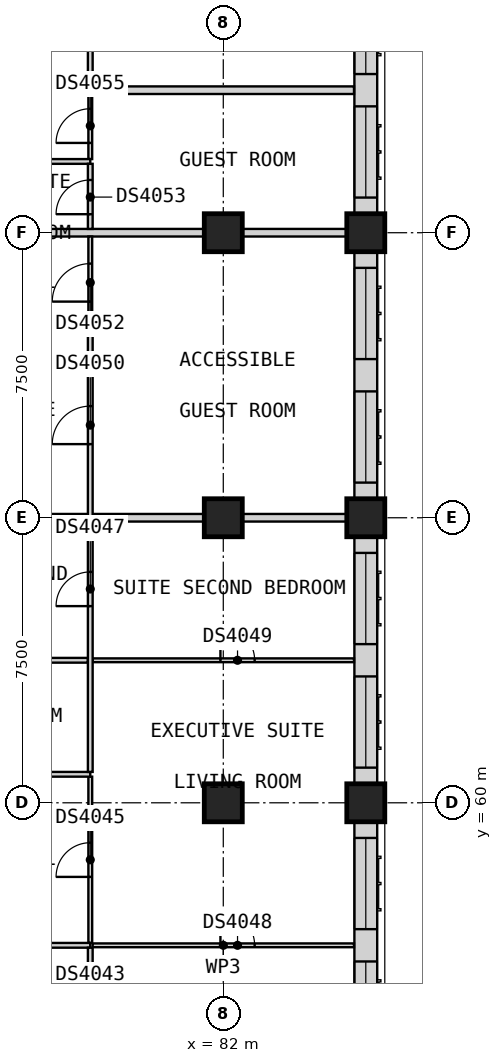
"""IFC4 building model, lengths in metres.
Left out: names, types, materials, properties, quantities, classifications, styles, units other than length and angle.
Written with IfcOpenShell. Run it as: python <this file> out.ifc"""

import sys

from ifc_helpers import new_model, si_unit, direction, frame, frame_2d, origin, origin_2d, place, context, subcontext, project, spatial, rectangle, extrude, element, fill, save


model = new_model("IFC4")
c1 = context("Model", 3, precision=1e-05, world=origin(), true_north=direction((0.0, 1.0)))
c2 = subcontext(c1, "Body", "Model", "MODEL_VIEW")
j1 = project(units=[si_unit("LENGTHUNIT", "METRE"), si_unit("PLANEANGLEUNIT", "RADIAN")], contexts=[c1])
p1 = place(None, origin())
s1 = spatial("IfcSite", under=j1, at=p1, CompositionType="ELEMENT")
p2 = place(p1, origin())
s2 = spatial("IfcBuilding", under=s1, at=p2, CompositionType="ELEMENT")
p3 = place(p2, frame((0.0, 0.0, 141.0)))
s3 = spatial("IfcBuildingStorey", under=s2, at=p3, CompositionType="ELEMENT", Elevation=141.0)
for number, where, z_axis, x_axis in (
    (1, (85.75, 60.0, 0.0), (0.0, 0.0, 1.0), (1.0, 0.0, 0.0)),
    (2, (85.75, 67.5, 0.0), (0.0, 0.0, 1.0), (1.0, 0.0, 0.0)),
    (3, (85.75, 75.0, 0.0), (0.0, 0.0, 1.0), (1.0, 0.0, 0.0)),
    (4, (82.0, 60.0, 0.0), (0.0, 0.0, 1.0), (1.0, 0.0, 0.0)),
    (5, (82.0, 67.5, 0.0), (0.0, 0.0, 1.0), (1.0, 0.0, 0.0)),
    (6, (82.0, 75.0, 0.0), (0.0, 0.0, 1.0), (1.0, 0.0, 0.0)),
):
    element("IfcColumn", number, at=place(p3, frame(where, z_axis=z_axis, x_axis=x_axis)), inside=s3, PredefinedType="COLUMN", context=c2, shape_type="SweptSolid", body=[
        extrude(rectangle(XDim=1.0, YDim=1.0, at=origin_2d()), origin(), (0.0, 0.0, 1.0), 3.6),
    ])
p4 = place(p3, frame((85.75, 53.0, 0.0), z_axis=(0.0, 0.0, 1.0), x_axis=(0.0, 1.0, 0.0)))
e7 = element("IfcWall", 7, at=p4, inside=s3, PredefinedType="SOLIDWALL", context=c2, shape_type="SweptSolid", body=[
    extrude(rectangle(XDim=6.5, YDim=0.6, at=frame_2d((3.25, 0.0))), origin(), (0.0, 0.0, 1.0), 2.85),
])
p5 = place(p4, frame((0.425, 0.0, 0.8)))
e8 = element("IfcOpeningElement", 8, at=p5, cuts=e7, PredefinedType="OPENING", context=c2, shape_type="SweptSolid", body=[
    extrude(rectangle(XDim=2.4, YDim=1.8, at=frame_2d((1.2, 0.9))), frame((0.0, 0.31, 0.0), z_axis=(0.0, -1.0, 0.0), x_axis=(1.0, 0.0, 0.0)), (0.0, 0.0, 1.0), 0.62),
])
p6 = place(p4, frame((3.675, 0.0, 0.8)))
e9 = element("IfcOpeningElement", 9, at=p6, cuts=e7, PredefinedType="OPENING", context=c2, shape_type="SweptSolid", body=[
    extrude(rectangle(XDim=2.4, YDim=1.8, at=frame_2d((1.2, 0.9))), frame((0.0, 0.31, 0.0), z_axis=(0.0, -1.0, 0.0), x_axis=(1.0, 0.0, 0.0)), (0.0, 0.0, 1.0), 0.62),
])
p7 = place(p3, frame((85.75, 60.5, 0.0), z_axis=(0.0, 0.0, 1.0), x_axis=(0.0, 1.0, 0.0)))
e10 = element("IfcWall", 10, at=p7, inside=s3, PredefinedType="SOLIDWALL", context=c2, shape_type="SweptSolid", body=[
    extrude(rectangle(XDim=6.5, YDim=0.6, at=frame_2d((3.25, 0.0))), origin(), (0.0, 0.0, 1.0), 2.85),
])
p8 = place(p7, frame((0.425, 0.0, 0.8)))
e11 = element("IfcOpeningElement", 11, at=p8, cuts=e10, PredefinedType="OPENING", context=c2, shape_type="SweptSolid", body=[
    extrude(rectangle(XDim=2.4, YDim=1.8, at=frame_2d((1.2, 0.9))), frame((0.0, 0.31, 0.0), z_axis=(0.0, -1.0, 0.0), x_axis=(1.0, 0.0, 0.0)), (0.0, 0.0, 1.0), 0.62),
])
p9 = place(p7, frame((3.675, 0.0, 0.8)))
e12 = element("IfcOpeningElement", 12, at=p9, cuts=e10, PredefinedType="OPENING", context=c2, shape_type="SweptSolid", body=[
    extrude(rectangle(XDim=2.4, YDim=1.8, at=frame_2d((1.2, 0.9))), frame((0.0, 0.31, 0.0), z_axis=(0.0, -1.0, 0.0), x_axis=(1.0, 0.0, 0.0)), (0.0, 0.0, 1.0), 0.62),
])
p10 = place(p3, frame((85.75, 68.0, 0.0), z_axis=(0.0, 0.0, 1.0), x_axis=(0.0, 1.0, 0.0)))
e13 = element("IfcWall", 13, at=p10, inside=s3, PredefinedType="SOLIDWALL", context=c2, shape_type="SweptSolid", body=[
    extrude(rectangle(XDim=6.5, YDim=0.6, at=frame_2d((3.25, 0.0))), origin(), (0.0, 0.0, 1.0), 2.85),
])
p11 = place(p10, frame((0.425, 0.0, 0.8)))
e14 = element("IfcOpeningElement", 14, at=p11, cuts=e13, PredefinedType="OPENING", context=c2, shape_type="SweptSolid", body=[
    extrude(rectangle(XDim=2.4, YDim=1.8, at=frame_2d((1.2, 0.9))), frame((0.0, 0.31, 0.0), z_axis=(0.0, -1.0, 0.0), x_axis=(1.0, 0.0, 0.0)), (0.0, 0.0, 1.0), 0.62),
])
p12 = place(p10, frame((3.675, 0.0, 0.8)))
e15 = element("IfcOpeningElement", 15, at=p12, cuts=e13, PredefinedType="OPENING", context=c2, shape_type="SweptSolid", body=[
    extrude(rectangle(XDim=2.4, YDim=1.8, at=frame_2d((1.2, 0.9))), frame((0.0, 0.31, 0.0), z_axis=(0.0, -1.0, 0.0), x_axis=(1.0, 0.0, 0.0)), (0.0, 0.0, 1.0), 0.62),
])
p13 = place(p3, frame((85.75, 75.5, 0.0), z_axis=(0.0, 0.0, 1.0), x_axis=(0.0, 1.0, 0.0)))
e16 = element("IfcWall", 16, at=p13, inside=s3, PredefinedType="SOLIDWALL", context=c2, shape_type="SweptSolid", body=[
    extrude(rectangle(XDim=6.5, YDim=0.6, at=frame_2d((3.25, 0.0))), origin(), (0.0, 0.0, 1.0), 2.85),
])
p14 = place(p13, frame((0.425, 0.0, 0.8)))
e17 = element("IfcOpeningElement", 17, at=p14, cuts=e16, PredefinedType="OPENING", context=c2, shape_type="SweptSolid", body=[
    extrude(rectangle(XDim=2.4, YDim=1.8, at=frame_2d((1.2, 0.9))), frame((0.0, 0.31, 0.0), z_axis=(0.0, -1.0, 0.0), x_axis=(1.0, 0.0, 0.0)), (0.0, 0.0, 1.0), 0.62),
])
p15 = place(p13, frame((3.675, 0.0, 0.8)))
e18 = element("IfcOpeningElement", 18, at=p15, cuts=e16, PredefinedType="OPENING", context=c2, shape_type="SweptSolid", body=[
    extrude(rectangle(XDim=2.4, YDim=1.8, at=frame_2d((1.2, 0.9))), frame((0.0, 0.31, 0.0), z_axis=(0.0, -1.0, 0.0), x_axis=(1.0, 0.0, 0.0)), (0.0, 0.0, 1.0), 0.62),
])
for number, where, z_axis, x_axis in (
    (19, (73.725, 67.5, 0.0), (0.0, 0.0, 1.0), (1.0, 0.0, 0.0)),
    (20, (73.725, 75.0, 0.0), (0.0, 0.0, 1.0), (1.0, 0.0, 0.0)),
):
    element("IfcWall", number, at=place(p3, frame(where, z_axis=z_axis, x_axis=x_axis)), inside=s3, PredefinedType="PARTITIONING", context=c2, shape_type="SweptSolid", body=[
        extrude(rectangle(XDim=12.525, YDim=0.2, at=frame_2d((6.262, 0.0))), origin(), (0.0, 0.0, 1.0), 3.35),
    ])
p16 = place(p3, frame((73.725, 78.75, 0.0), z_axis=(0.0, 0.0, 1.0), x_axis=(1.0, 0.0, 0.0)))
e21 = element("IfcWall", 21, at=p16, inside=s3, PredefinedType="PARTITIONING", context=c2, shape_type="SweptSolid", body=[
    extrude(rectangle(XDim=11.715, YDim=0.2, at=frame_2d((5.857, 0.0))), origin(), (0.0, 0.0, 1.0), 3.35),
])
p17 = place(p3, frame((78.562, 56.25, 0.0), z_axis=(0.0, 0.0, 1.0), x_axis=(1.0, 0.0, 0.0)))
e22 = element("IfcWall", 22, at=p17, inside=s3, PredefinedType="PARTITIONING", context=c2, shape_type="SweptSolid", body=[
    extrude(rectangle(XDim=6.877, YDim=0.1, at=frame_2d((3.439, 0.0))), origin(), (0.0, 0.0, 1.0), 3.35),
])
p18 = place(p17, frame((3.363, 0.0, 0.0)))
e23 = element("IfcOpeningElement", 23, at=p18, cuts=e22, PredefinedType="OPENING", context=c2, shape_type="SweptSolid", body=[
    extrude(rectangle(XDim=0.9, YDim=2.1, at=frame_2d((0.45, 1.05))), frame((0.0, 0.06, 0.0), z_axis=(0.0, -1.0, 0.0), x_axis=(1.0, 0.0, 0.0)), (0.0, 0.0, 1.0), 0.12),
])
p19 = place(p3, frame((78.562, 63.75, 0.0), z_axis=(0.0, 0.0, 1.0), x_axis=(1.0, 0.0, 0.0)))
e24 = element("IfcWall", 24, at=p19, inside=s3, PredefinedType="PARTITIONING", context=c2, shape_type="SweptSolid", body=[
    extrude(rectangle(XDim=6.877, YDim=0.1, at=frame_2d((3.439, 0.0))), origin(), (0.0, 0.0, 1.0), 3.35),
])
p20 = place(p19, frame((3.363, 0.0, 0.0)))
e25 = element("IfcOpeningElement", 25, at=p20, cuts=e24, PredefinedType="OPENING", context=c2, shape_type="SweptSolid", body=[
    extrude(rectangle(XDim=0.9, YDim=2.1, at=frame_2d((0.45, 1.05))), frame((0.0, 0.06, 0.0), z_axis=(0.0, -1.0, 0.0), x_axis=(1.0, 0.0, 0.0)), (0.0, 0.0, 1.0), 0.12),
])
p21 = place(p3, frame((78.5, 56.312, 0.0), z_axis=(0.0, 0.0, 1.0), x_axis=(0.0, 1.0, 0.0)))
e26 = element("IfcWall", 26, at=p21, inside=s3, PredefinedType="PARTITIONING", context=c2, shape_type="SweptSolid", body=[
    extrude(rectangle(XDim=4.375, YDim=0.1, at=frame_2d((2.188, 0.0))), origin(), (0.0, 0.0, 1.0), 3.35),
])
p22 = place(p21, frame((1.738, 0.0, 0.0)))
e27 = element("IfcOpeningElement", 27, at=p22, cuts=e26, PredefinedType="OPENING", context=c2, shape_type="SweptSolid", body=[
    extrude(rectangle(XDim=0.9, YDim=2.1, at=frame_2d((0.45, 1.05))), frame((0.0, 0.06, 0.0), z_axis=(0.0, -1.0, 0.0), x_axis=(1.0, 0.0, 0.0)), (0.0, 0.0, 1.0), 0.12),
])
p23 = place(p3, frame((78.5, 72.438, 0.0), z_axis=(0.0, 0.0, 1.0), x_axis=(0.0, 1.0, 0.0)))
e28 = element("IfcWall", 28, at=p23, inside=s3, PredefinedType="PARTITIONING", context=c2, shape_type="SweptSolid", body=[
    extrude(rectangle(XDim=2.462, YDim=0.1, at=frame_2d((1.231, 0.0))), origin(), (0.0, 0.0, 1.0), 3.35),
])
p24 = place(p23, frame((0.75, 0.0, 0.0)))
e29 = element("IfcOpeningElement", 29, at=p24, cuts=e28, PredefinedType="OPENING", context=c2, shape_type="SweptSolid", body=[
    extrude(rectangle(XDim=1.0, YDim=2.1, at=frame_2d((0.5, 1.05))), frame((0.0, 0.06, 0.0), z_axis=(0.0, -1.0, 0.0), x_axis=(1.0, 0.0, 0.0)), (0.0, 0.0, 1.0), 0.12),
])
p25 = place(p3, frame((78.5, 76.938, 0.0), z_axis=(0.0, 0.0, 1.0), x_axis=(0.0, 1.0, 0.0)))
e30 = element("IfcWall", 30, at=p25, inside=s3, PredefinedType="PARTITIONING", context=c2, shape_type="SweptSolid", body=[
    extrude(rectangle(XDim=1.712, YDim=0.1, at=frame_2d((0.856, 0.0))), origin(), (0.0, 0.0, 1.0), 3.35),
])
p26 = place(p25, frame((0.425, 0.0, 0.0)))
e31 = element("IfcOpeningElement", 31, at=p26, cuts=e30, PredefinedType="OPENING", context=c2, shape_type="SweptSolid", body=[
    extrude(rectangle(XDim=0.9, YDim=2.1, at=frame_2d((0.45, 1.05))), frame((0.0, 0.06, 0.0), z_axis=(0.0, -1.0, 0.0), x_axis=(1.0, 0.0, 0.0)), (0.0, 0.0, 1.0), 0.12),
])
p27 = place(p3, frame((73.725, 56.25, 0.0), z_axis=(0.0, 0.0, 1.0), x_axis=(1.0, 0.0, 0.0)))
e32 = element("IfcWall", 32, at=p27, inside=s3, PredefinedType="PARTITIONING", context=c2, shape_type="SweptSolid", body=[
    extrude(rectangle(XDim=4.775, YDim=0.125, at=frame_2d((2.387, 0.0))), origin(), (0.0, 0.0, 1.0), 3.35),
])
p28 = place(p3, frame((73.725, 60.75, 0.0), z_axis=(0.0, 0.0, 1.0), x_axis=(1.0, 0.0, 0.0)))
e33 = element("IfcWall", 33, at=p28, inside=s3, PredefinedType="PARTITIONING", context=c2, shape_type="SweptSolid", body=[
    extrude(rectangle(XDim=4.775, YDim=0.125, at=frame_2d((2.387, 0.0))), origin(), (0.0, 0.0, 1.0), 3.35),
])
p29 = place(p28, frame((1.9, 0.0, 0.0)))
e34 = element("IfcOpeningElement", 34, at=p29, cuts=e33, PredefinedType="OPENING", context=c2, shape_type="SweptSolid", body=[
    extrude(rectangle(XDim=0.9, YDim=2.1, at=frame_2d((0.45, 1.05))), frame((0.0, 0.073, 0.0), z_axis=(0.0, -1.0, 0.0), x_axis=(1.0, 0.0, 0.0)), (0.0, 0.0, 1.0), 0.145),
])
p30 = place(p3, frame((73.725, 63.75, 0.0), z_axis=(0.0, 0.0, 1.0), x_axis=(1.0, 0.0, 0.0)))
e35 = element("IfcWall", 35, at=p30, inside=s3, PredefinedType="PARTITIONING", context=c2, shape_type="SweptSolid", body=[
    extrude(rectangle(XDim=4.712, YDim=0.125, at=frame_2d((2.356, 0.0))), origin(), (0.0, 0.0, 1.0), 3.35),
])
for number, where, z_axis, x_axis in (
    (36, (73.725, 72.375, 0.0), (0.0, 0.0, 1.0), (1.0, 0.0, 0.0)),
    (37, (73.725, 76.875, 0.0), (0.0, 0.0, 1.0), (1.0, 0.0, 0.0)),
):
    element("IfcWall", number, at=place(p3, frame(where, z_axis=z_axis, x_axis=x_axis)), inside=s3, PredefinedType="PARTITIONING", context=c2, shape_type="SweptSolid", body=[
        extrude(rectangle(XDim=4.775, YDim=0.125, at=frame_2d((2.387, 0.0))), origin(), (0.0, 0.0, 1.0), 3.35),
    ])
p31 = place(p3, frame((78.5, 52.6, 0.0), z_axis=(0.0, 0.0, 1.0), x_axis=(0.0, 1.0, 0.0)))
e38 = element("IfcWall", 38, at=p31, inside=s3, PredefinedType="PARTITIONING", context=c2, shape_type="SweptSolid", body=[
    extrude(rectangle(XDim=3.587, YDim=0.125, at=frame_2d((1.794, 0.0))), origin(), (0.0, 0.0, 1.0), 3.35),
])
p32 = place(p31, frame((1.325, 0.0, 0.0)))
e39 = element("IfcOpeningElement", 39, at=p32, cuts=e38, PredefinedType="OPENING", context=c2, shape_type="SweptSolid", body=[
    extrude(rectangle(XDim=0.9, YDim=2.1, at=frame_2d((0.45, 1.05))), frame((0.0, 0.073, 0.0), z_axis=(0.0, -1.0, 0.0), x_axis=(1.0, 0.0, 0.0)), (0.0, 0.0, 1.0), 0.145),
])
p33 = place(p3, frame((78.5, 60.812, 0.0), z_axis=(0.0, 0.0, 1.0), x_axis=(0.0, 1.0, 0.0)))
e40 = element("IfcWall", 40, at=p33, inside=s3, PredefinedType="PARTITIONING", context=c2, shape_type="SweptSolid", body=[
    extrude(rectangle(XDim=11.5, YDim=0.125, at=frame_2d((5.75, 0.0))), origin(), (0.0, 0.0, 1.0), 3.35),
])
p34 = place(p33, frame((4.363, 0.0, 0.0)))
e41 = element("IfcOpeningElement", 41, at=p34, cuts=e40, PredefinedType="OPENING", context=c2, shape_type="SweptSolid", body=[
    extrude(rectangle(XDim=0.9, YDim=2.1, at=frame_2d((0.45, 1.05))), frame((0.0, 0.073, 0.0), z_axis=(0.0, -1.0, 0.0), x_axis=(1.0, 0.0, 0.0)), (0.0, 0.0, 1.0), 0.145),
])
p35 = place(p33, frame((8.625, 0.0, 0.0)))
e42 = element("IfcOpeningElement", 42, at=p35, cuts=e40, PredefinedType="OPENING", context=c2, shape_type="SweptSolid", body=[
    extrude(rectangle(XDim=1.0, YDim=2.1, at=frame_2d((0.5, 1.05))), frame((0.0, 0.073, 0.0), z_axis=(0.0, -1.0, 0.0), x_axis=(1.0, 0.0, 0.0)), (0.0, 0.0, 1.0), 0.145),
])
p36 = place(p3, frame((78.5, 75.1, 0.0), z_axis=(0.0, 0.0, 1.0), x_axis=(0.0, 1.0, 0.0)))
e43 = element("IfcWall", 43, at=p36, inside=s3, PredefinedType="PARTITIONING", context=c2, shape_type="SweptSolid", body=[
    extrude(rectangle(XDim=1.712, YDim=0.125, at=frame_2d((0.856, 0.0))), origin(), (0.0, 0.0, 1.0), 3.35),
])
p37 = place(p36, frame((0.387, 0.0, 0.0)))
e44 = element("IfcOpeningElement", 44, at=p37, cuts=e43, PredefinedType="OPENING", context=c2, shape_type="SweptSolid", body=[
    extrude(rectangle(XDim=0.9, YDim=2.1, at=frame_2d((0.45, 1.05))), frame((0.0, 0.073, 0.0), z_axis=(0.0, -1.0, 0.0), x_axis=(1.0, 0.0, 0.0)), (0.0, 0.0, 1.0), 0.145),
])
p38 = place(p3, frame((78.5, 78.85, 0.0), z_axis=(0.0, 0.0, 1.0), x_axis=(0.0, 1.0, 0.0)))
e45 = element("IfcWall", 45, at=p38, inside=s3, PredefinedType="PARTITIONING", context=c2, shape_type="SweptSolid", body=[
    extrude(rectangle(XDim=4.337, YDim=0.125, at=frame_2d((2.169, 0.0))), origin(), (0.0, 0.0, 1.0), 3.35),
])
p39 = place(p38, frame((1.7, 0.0, 0.0)))
e46 = element("IfcOpeningElement", 46, at=p39, cuts=e45, PredefinedType="OPENING", context=c2, shape_type="SweptSolid", body=[
    extrude(rectangle(XDim=0.9, YDim=2.1, at=frame_2d((0.45, 1.05))), frame((0.0, 0.073, 0.0), z_axis=(0.0, -1.0, 0.0), x_axis=(1.0, 0.0, 0.0)), (0.0, 0.0, 1.0), 0.145),
])
p40 = place(p5, origin())
e47 = element("IfcWindow", 47, at=p40, inside=s3, PartitioningType="SINGLE_PANEL", PredefinedType="WINDOW", context=c2, shape_type="SweptSolid", body=[
    extrude(rectangle(XDim=2.4, YDim=1.8, at=frame_2d((1.2, 0.9))), frame((0.0, -0.07, 0.0), z_axis=(0.0, -1.0, 0.0), x_axis=(1.0, 0.0, 0.0)), (0.0, 0.0, 1.0), 0.06),
])
fill(e8, e47)
p41 = place(p6, origin())
e48 = element("IfcWindow", 48, at=p41, inside=s3, PartitioningType="SINGLE_PANEL", PredefinedType="WINDOW", context=c2, shape_type="SweptSolid", body=[
    extrude(rectangle(XDim=2.4, YDim=1.8, at=frame_2d((1.2, 0.9))), frame((0.0, -0.07, 0.0), z_axis=(0.0, -1.0, 0.0), x_axis=(1.0, 0.0, 0.0)), (0.0, 0.0, 1.0), 0.06),
])
fill(e9, e48)
p42 = place(p8, origin())
e49 = element("IfcWindow", 49, at=p42, inside=s3, PartitioningType="SINGLE_PANEL", PredefinedType="WINDOW", context=c2, shape_type="SweptSolid", body=[
    extrude(rectangle(XDim=2.4, YDim=1.8, at=frame_2d((1.2, 0.9))), frame((0.0, -0.07, 0.0), z_axis=(0.0, -1.0, 0.0), x_axis=(1.0, 0.0, 0.0)), (0.0, 0.0, 1.0), 0.06),
])
fill(e11, e49)
p43 = place(p9, origin())
e50 = element("IfcWindow", 50, at=p43, inside=s3, PartitioningType="SINGLE_PANEL", PredefinedType="WINDOW", context=c2, shape_type="SweptSolid", body=[
    extrude(rectangle(XDim=2.4, YDim=1.8, at=frame_2d((1.2, 0.9))), frame((0.0, -0.07, 0.0), z_axis=(0.0, -1.0, 0.0), x_axis=(1.0, 0.0, 0.0)), (0.0, 0.0, 1.0), 0.06),
])
fill(e12, e50)
p44 = place(p11, origin())
e51 = element("IfcWindow", 51, at=p44, inside=s3, PartitioningType="SINGLE_PANEL", PredefinedType="WINDOW", context=c2, shape_type="SweptSolid", body=[
    extrude(rectangle(XDim=2.4, YDim=1.8, at=frame_2d((1.2, 0.9))), frame((0.0, -0.07, 0.0), z_axis=(0.0, -1.0, 0.0), x_axis=(1.0, 0.0, 0.0)), (0.0, 0.0, 1.0), 0.06),
])
fill(e14, e51)
p45 = place(p12, origin())
e52 = element("IfcWindow", 52, at=p45, inside=s3, PartitioningType="SINGLE_PANEL", PredefinedType="WINDOW", context=c2, shape_type="SweptSolid", body=[
    extrude(rectangle(XDim=2.4, YDim=1.8, at=frame_2d((1.2, 0.9))), frame((0.0, -0.07, 0.0), z_axis=(0.0, -1.0, 0.0), x_axis=(1.0, 0.0, 0.0)), (0.0, 0.0, 1.0), 0.06),
])
fill(e15, e52)
p46 = place(p14, origin())
e53 = element("IfcWindow", 53, at=p46, inside=s3, PartitioningType="SINGLE_PANEL", PredefinedType="WINDOW", context=c2, shape_type="SweptSolid", body=[
    extrude(rectangle(XDim=2.4, YDim=1.8, at=frame_2d((1.2, 0.9))), frame((0.0, -0.07, 0.0), z_axis=(0.0, -1.0, 0.0), x_axis=(1.0, 0.0, 0.0)), (0.0, 0.0, 1.0), 0.06),
])
fill(e17, e53)
p47 = place(p15, origin())
e54 = element("IfcWindow", 54, at=p47, inside=s3, PartitioningType="SINGLE_PANEL", PredefinedType="WINDOW", context=c2, shape_type="SweptSolid", body=[
    extrude(rectangle(XDim=2.4, YDim=1.8, at=frame_2d((1.2, 0.9))), frame((0.0, -0.07, 0.0), z_axis=(0.0, -1.0, 0.0), x_axis=(1.0, 0.0, 0.0)), (0.0, 0.0, 1.0), 0.06),
])
fill(e18, e54)
p48 = place(p22, origin())
e55 = element("IfcDoor", 55, at=p48, inside=s3, OperationType="SINGLE_SWING_LEFT", PredefinedType="DOOR", context=c2, shape_type="SweptSolid", body=[
    extrude(rectangle(XDim=0.9, YDim=2.1, at=frame_2d((0.45, 1.05))), frame((0.0, 0.025, 0.0), z_axis=(0.0, -1.0, 0.0), x_axis=(1.0, 0.0, 0.0)), (0.0, 0.0, 1.0), 0.05),
])
fill(e27, e55)
p49 = place(p34, origin())
e56 = element("IfcDoor", 56, at=p49, inside=s3, OperationType="SINGLE_SWING_LEFT", PredefinedType="DOOR", context=c2, shape_type="SweptSolid", body=[
    extrude(rectangle(XDim=0.9, YDim=2.1, at=frame_2d((0.45, 1.05))), frame((0.0, 0.025, 0.0), z_axis=(0.0, -1.0, 0.0), x_axis=(1.0, 0.0, 0.0)), (0.0, 0.0, 1.0), 0.05),
])
fill(e41, e56)
p50 = place(p18, origin())
e57 = element("IfcDoor", 57, at=p50, inside=s3, OperationType="SINGLE_SWING_RIGHT", PredefinedType="DOOR", context=c2, shape_type="SweptSolid", body=[
    extrude(rectangle(XDim=0.9, YDim=2.1, at=frame_2d((0.45, 1.05))), frame((0.0, 0.025, 0.0), z_axis=(0.0, -1.0, 0.0), x_axis=(1.0, 0.0, 0.0)), (0.0, 0.0, 1.0), 0.05),
])
fill(e23, e57)
p51 = place(p20, origin())
e58 = element("IfcDoor", 58, at=p51, inside=s3, OperationType="SINGLE_SWING_RIGHT", PredefinedType="DOOR", context=c2, shape_type="SweptSolid", body=[
    extrude(rectangle(XDim=0.9, YDim=2.1, at=frame_2d((0.45, 1.05))), frame((0.0, 0.025, 0.0), z_axis=(0.0, -1.0, 0.0), x_axis=(1.0, 0.0, 0.0)), (0.0, 0.0, 1.0), 0.05),
])
fill(e25, e58)
p52 = place(p35, origin())
e59 = element("IfcDoor", 59, at=p52, inside=s3, OperationType="SINGLE_SWING_LEFT", PredefinedType="DOOR", context=c2, shape_type="SweptSolid", body=[
    extrude(rectangle(XDim=1.0, YDim=2.1, at=frame_2d((0.5, 1.05))), frame((0.0, 0.025, 0.0), z_axis=(0.0, -1.0, 0.0), x_axis=(1.0, 0.0, 0.0)), (0.0, 0.0, 1.0), 0.05),
])
fill(e42, e59)
p53 = place(p24, origin())
e60 = element("IfcDoor", 60, at=p53, inside=s3, OperationType="SINGLE_SWING_LEFT", PredefinedType="DOOR", context=c2, shape_type="SweptSolid", body=[
    extrude(rectangle(XDim=1.0, YDim=2.1, at=frame_2d((0.5, 1.05))), frame((0.0, 0.025, 0.0), z_axis=(0.0, -1.0, 0.0), x_axis=(1.0, 0.0, 0.0)), (0.0, 0.0, 1.0), 0.05),
])
fill(e29, e60)
p54 = place(p37, origin())
e61 = element("IfcDoor", 61, at=p54, inside=s3, OperationType="SINGLE_SWING_LEFT", PredefinedType="DOOR", context=c2, shape_type="SweptSolid", body=[
    extrude(rectangle(XDim=0.9, YDim=2.1, at=frame_2d((0.45, 1.05))), frame((0.0, 0.025, 0.0), z_axis=(0.0, -1.0, 0.0), x_axis=(1.0, 0.0, 0.0)), (0.0, 0.0, 1.0), 0.05),
])
fill(e44, e61)
p55 = place(p26, origin())
e62 = element("IfcDoor", 62, at=p55, inside=s3, OperationType="SINGLE_SWING_LEFT", PredefinedType="DOOR", context=c2, shape_type="SweptSolid", body=[
    extrude(rectangle(XDim=0.9, YDim=2.1, at=frame_2d((0.45, 1.05))), frame((0.0, 0.025, 0.0), z_axis=(0.0, -1.0, 0.0), x_axis=(1.0, 0.0, 0.0)), (0.0, 0.0, 1.0), 0.05),
])
fill(e31, e62)
save(model, sys.argv[1])
